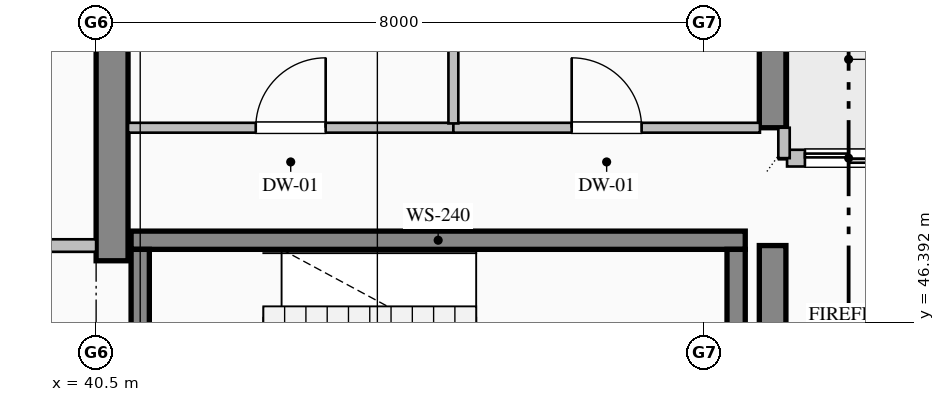
"""IFC4 building model, lengths in metres.
Left out: names, types, materials, properties, quantities, classifications, styles, units other than length and angle.
Written with IfcOpenShell. Run it as: python <this file> out.ifc"""

import sys

from ifc_helpers import new_model, si_unit, direction, frame, frame_2d, origin, place, context, subcontext, project, spatial, rectangle, extrude, element, fill, save


model = new_model("IFC4")
c1 = context("Model", 3, precision=1e-05, world=origin(), true_north=direction((0.0, 1.0)))
c2 = subcontext(c1, "Body", "Model", "MODEL_VIEW")
j1 = project(units=[si_unit("LENGTHUNIT", "METRE"), si_unit("PLANEANGLEUNIT", "RADIAN")], contexts=[c1])
p1 = place(None, origin())
s1 = spatial("IfcSite", under=j1, at=p1, CompositionType="ELEMENT")
p2 = place(p1, origin())
s2 = spatial("IfcBuilding", under=s1, at=p2, CompositionType="ELEMENT")
p3 = place(p2, frame((0.0, 0.0, 363.2)))
s3 = spatial("IfcBuildingStorey", under=s2, at=p3, CompositionType="ELEMENT", Elevation=363.2)
p4 = place(p3, frame((40.71, 47.2, 0.0), z_axis=(0.0, 0.0, 1.0), x_axis=(0.0, 1.0, 0.0)))
e1 = element("IfcWall", 1, at=p4, inside=s3, PredefinedType="SHEAR", context=c2, shape_type="SweptSolid", body=[
    extrude(rectangle(XDim=4.38, YDim=0.42, at=frame_2d((2.19, 0.0))), origin(), (0.0, 0.0, 1.0), 3.58),
])
p5 = place(p3, frame((49.4, 44.4, 0.0), z_axis=(0.0, 0.0, 1.0), x_axis=(0.0, 1.0, 0.0)))
e2 = element("IfcWall", 2, at=p5, inside=s3, PredefinedType="SHEAR", context=c2, shape_type="SweptSolid", body=[
    extrude(rectangle(XDim=3.0, YDim=0.35, at=frame_2d((1.5, 0.0))), origin(), (0.0, 0.0, 1.0), 3.58),
])
p6 = place(p3, frame((49.4, 48.95, 0.0), z_axis=(0.0, 0.0, 1.0), x_axis=(0.0, 1.0, 0.0)))
e3 = element("IfcWall", 3, at=p6, inside=s3, PredefinedType="SHEAR", context=c2, shape_type="SweptSolid", body=[
    extrude(rectangle(XDim=2.63, YDim=0.35, at=frame_2d((1.315, 0.0))), origin(), (0.0, 0.0, 1.0), 3.58),
])
p7 = place(p3, frame((40.96, 47.47, 0.0), z_axis=(0.0, 0.0, 1.0), x_axis=(1.0, 0.0, 0.0)))
e4 = element("IfcWall", 4, at=p7, inside=s3, PredefinedType="SOLIDWALL", context=c2, shape_type="SweptSolid", body=[
    extrude(rectangle(XDim=8.08, YDim=0.24, at=frame_2d((4.04, 0.0))), origin(), (0.0, 0.0, 1.0), 4.0),
])
p8 = place(p3, frame((41.08, 47.35, 0.0), z_axis=(0.0, 0.0, 1.0), x_axis=(0.0, -1.0, 0.0)))
e5 = element("IfcWall", 5, at=p8, inside=s3, PredefinedType="SOLIDWALL", context=c2, shape_type="SweptSolid", body=[
    extrude(rectangle(XDim=3.15, YDim=0.24, at=frame_2d((1.575, 0.0))), origin(), (0.0, 0.0, 1.0), 4.0),
])
p9 = place(p8, frame((1.0, 0.0, 0.0)))
e6 = element("IfcOpeningElement", 6, at=p9, cuts=e5, PredefinedType="OPENING", context=c2, shape_type="SweptSolid", body=[
    extrude(rectangle(XDim=1.15, YDim=2.2, at=frame_2d((0.575, 1.1))), frame((0.0, 0.13, 0.0), z_axis=(0.0, -1.0, 0.0), x_axis=(1.0, 0.0, 0.0)), (0.0, 0.0, 1.0), 0.26),
])
p10 = place(p3, frame((48.92, 44.2, 0.0), z_axis=(0.0, 0.0, 1.0), x_axis=(0.0, 1.0, 0.0)))
e7 = element("IfcWall", 7, at=p10, inside=s3, PredefinedType="SOLIDWALL", context=c2, shape_type="SweptSolid", body=[
    extrude(rectangle(XDim=3.15, YDim=0.24, at=frame_2d((1.575, 0.0))), origin(), (0.0, 0.0, 1.0), 4.0),
])
p11 = place(p3, frame((54.71, 48.55, 0.0), z_axis=(0.0, 0.0, 1.0), x_axis=(-1.0, 0.0, 0.0)))
e8 = element("IfcWall", 8, at=p11, inside=s3, PredefinedType="PARTITIONING", context=c2, shape_type="SweptSolid", body=[
    extrude(rectangle(XDim=5.12, YDim=0.22, at=frame_2d((2.56, 0.0))), origin(), (0.0, 0.0, 1.0), 3.58),
])
p12 = place(p11, frame((3.735, 0.0, 0.0)))
e9 = element("IfcOpeningElement", 9, at=p12, cuts=e8, PredefinedType="OPENING", context=c2, shape_type="SweptSolid", body=[
    extrude(rectangle(XDim=1.15, YDim=2.2, at=frame_2d((0.575, 1.1))), frame((0.0, 0.12, 0.0), z_axis=(0.0, -1.0, 0.0), x_axis=(1.0, 0.0, 0.0)), (0.0, 0.0, 1.0), 0.24),
])
p13 = place(p11, frame((0.935, 0.0, 0.0)))
e10 = element("IfcOpeningElement", 10, at=p13, cuts=e8, PredefinedType="OPENING", context=c2, shape_type="SweptSolid", body=[
    extrude(rectangle(XDim=1.15, YDim=2.2, at=frame_2d((0.575, 1.1))), frame((0.0, 0.12, 0.0), z_axis=(0.0, -1.0, 0.0), x_axis=(1.0, 0.0, 0.0)), (0.0, 0.0, 1.0), 0.24),
])
p14 = place(p3, frame((49.55, 48.55, 0.0), z_axis=(0.0, 0.0, 1.0), x_axis=(0.0, 1.0, 0.0)))
e11 = element("IfcWall", 11, at=p14, inside=s3, PredefinedType="PARTITIONING", context=c2, shape_type="SweptSolid", body=[
    extrude(rectangle(XDim=0.4, YDim=0.15, at=frame_2d((0.2, 0.0))), origin(), (0.0, 0.0, 1.0), 3.58),
])
p15 = place(p3, frame((37.8, 47.4, 0.0), z_axis=(0.0, 0.0, 1.0), x_axis=(1.0, 0.0, 0.0)))
e12 = element("IfcWall", 12, at=p15, inside=s3, PredefinedType="PARTITIONING", context=c2, shape_type="SweptSolid", body=[
    extrude(rectangle(XDim=2.7, YDim=0.165, at=frame_2d((1.35, 0.0))), origin(), (0.0, 0.0, 1.0), 3.58),
])
p16 = place(p15, frame((0.825, 0.0, 0.0)))
e13 = element("IfcOpeningElement", 13, at=p16, cuts=e12, PredefinedType="OPENING", context=c2, shape_type="SweptSolid", body=[
    extrude(rectangle(XDim=1.05, YDim=2.15, at=frame_2d((0.525, 1.075))), frame((0.0, 0.093, 0.0), z_axis=(0.0, -1.0, 0.0), x_axis=(1.0, 0.0, 0.0)), (0.0, 0.0, 1.0), 0.185),
])
p17 = place(p3, frame((40.92, 48.95, 0.0), z_axis=(0.0, 0.0, 1.0), x_axis=(1.0, 0.0, 0.0)))
e14 = element("IfcWall", 14, at=p17, inside=s3, PredefinedType="PARTITIONING", context=c2, shape_type="SweptSolid", body=[
    extrude(rectangle(XDim=4.28, YDim=0.13, at=frame_2d((2.14, 0.0))), origin(), (0.0, 0.0, 1.0), 3.58),
])
p18 = place(p17, frame((1.68, 0.0, 0.0)))
e15 = element("IfcOpeningElement", 15, at=p18, cuts=e14, PredefinedType="OPENING", context=c2, shape_type="SweptSolid", body=[
    extrude(rectangle(XDim=0.92, YDim=2.15, at=frame_2d((0.46, 1.075))), frame((0.0, 0.075, 0.0), z_axis=(0.0, -1.0, 0.0), x_axis=(1.0, 0.0, 0.0)), (0.0, 0.0, 1.0), 0.15),
])
p19 = place(p3, frame((45.2, 48.95, 0.0), z_axis=(0.0, 0.0, 1.0), x_axis=(1.0, 0.0, 0.0)))
e16 = element("IfcWall", 16, at=p19, inside=s3, PredefinedType="PARTITIONING", context=c2, shape_type="SweptSolid", body=[
    extrude(rectangle(XDim=4.033, YDim=0.13, at=frame_2d((2.017, 0.0))), origin(), (0.0, 0.0, 1.0), 3.58),
])
p20 = place(p19, frame((1.556, 0.0, 0.0)))
e17 = element("IfcOpeningElement", 17, at=p20, cuts=e16, PredefinedType="OPENING", context=c2, shape_type="SweptSolid", body=[
    extrude(rectangle(XDim=0.92, YDim=2.15, at=frame_2d((0.46, 1.075))), frame((0.0, 0.075, 0.0), z_axis=(0.0, -1.0, 0.0), x_axis=(1.0, 0.0, 0.0)), (0.0, 0.0, 1.0), 0.15),
])
p21 = place(p3, frame((45.2, 51.58, 0.0), z_axis=(0.0, 0.0, 1.0), x_axis=(0.0, -1.0, 0.0)))
e18 = element("IfcWall", 18, at=p21, inside=s3, PredefinedType="PARTITIONING", context=c2, shape_type="SweptSolid", body=[
    extrude(rectangle(XDim=2.573, YDim=0.13, at=frame_2d((1.287, 0.0))), origin(), (0.0, 0.0, 1.0), 3.58),
])
p22 = place(p12, origin())
e19 = element("IfcDoor", 19, at=p22, inside=s3, OperationType="DOUBLE_DOOR_SLIDING", PredefinedType="DOOR", context=c2, shape_type="SweptSolid", body=[
    extrude(rectangle(XDim=1.15, YDim=2.2, at=frame_2d((0.575, 1.1))), frame((0.0, 0.025, 0.0), z_axis=(0.0, -1.0, 0.0), x_axis=(1.0, 0.0, 0.0)), (0.0, 0.0, 1.0), 0.05),
])
fill(e9, e19)
p23 = place(p18, origin())
e20 = element("IfcDoor", 20, at=p23, inside=s3, OperationType="SINGLE_SWING_RIGHT", PredefinedType="DOOR", context=c2, shape_type="SweptSolid", body=[
    extrude(rectangle(XDim=0.92, YDim=2.15, at=frame_2d((0.46, 1.075))), frame((0.0, 0.025, 0.0), z_axis=(0.0, -1.0, 0.0), x_axis=(1.0, 0.0, 0.0)), (0.0, 0.0, 1.0), 0.05),
])
fill(e15, e20)
p24 = place(p20, origin())
e21 = element("IfcDoor", 21, at=p24, inside=s3, OperationType="SINGLE_SWING_LEFT", PredefinedType="DOOR", context=c2, shape_type="SweptSolid", body=[
    extrude(rectangle(XDim=0.92, YDim=2.15, at=frame_2d((0.46, 1.075))), frame((0.0, 0.025, 0.0), z_axis=(0.0, -1.0, 0.0), x_axis=(1.0, 0.0, 0.0)), (0.0, 0.0, 1.0), 0.05),
])
fill(e17, e21)
save(model, sys.argv[1])
